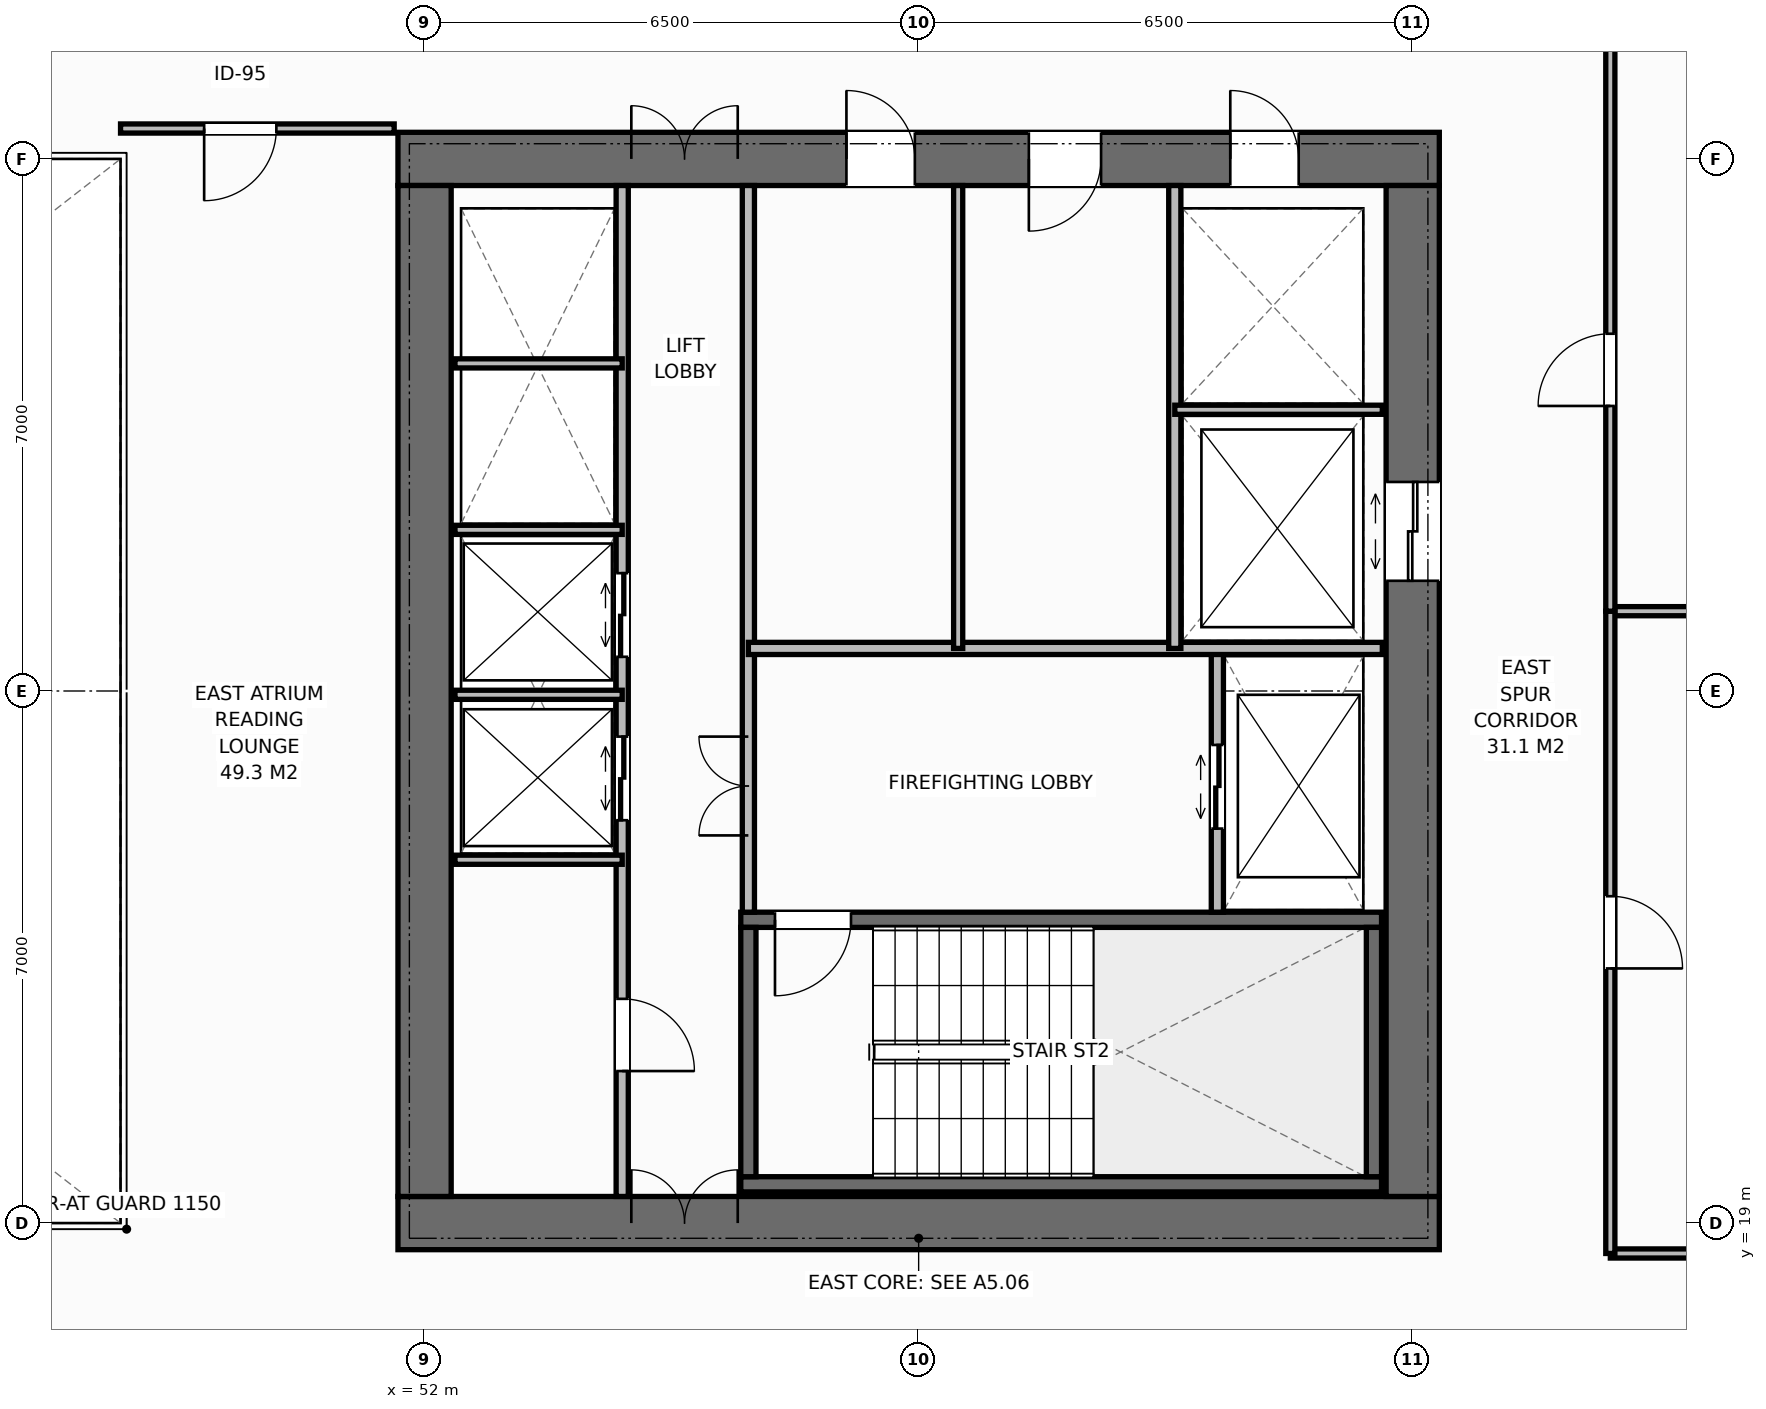
"""IFC4 building model, lengths in metres.
Left out: names, types, materials, properties, quantities, classifications, styles, units other than length and angle.
Written with IfcOpenShell. Run it as: python <this file> out.ifc"""

import sys

from ifc_helpers import new_model, si_unit, direction, frame, frame_2d, origin, place, context, subcontext, project, spatial, rectangle, extrude, element, fill, save


model = new_model("IFC4")
c1 = context("Model", 3, precision=1e-05, world=origin(), true_north=direction((0.0, 1.0)))
c2 = subcontext(c1, "Body", "Model", "MODEL_VIEW")
j1 = project(units=[si_unit("LENGTHUNIT", "METRE"), si_unit("PLANEANGLEUNIT", "RADIAN")], contexts=[c1])
p1 = place(None, origin())
s1 = spatial("IfcSite", under=j1, at=p1, CompositionType="ELEMENT")
p2 = place(p1, origin())
s2 = spatial("IfcBuilding", under=s1, at=p2, CompositionType="ELEMENT")
p3 = place(p2, frame((0.0, 0.0, 127.8)))
s3 = spatial("IfcBuildingStorey", under=s2, at=p3, CompositionType="ELEMENT", Elevation=127.8)
p4 = place(p3, frame((51.65, 19.0, 0.0), z_axis=(0.0, 0.0, 1.0), x_axis=(1.0, 0.0, 0.0)))
e1 = element("IfcWall", 1, at=p4, inside=s3, PredefinedType="SHEAR", context=c2, shape_type="SweptSolid", body=[
    extrude(rectangle(XDim=13.7, YDim=0.7, at=frame_2d((6.85, 0.0))), origin(), (0.0, 0.0, 1.0), 3.8),
])
p5 = place(p4, frame((3.07, 0.0, 0.0)))
e2 = element("IfcOpeningElement", 2, at=p5, cuts=e1, PredefinedType="OPENING", context=c2, shape_type="SweptSolid", body=[
    extrude(rectangle(XDim=1.4, YDim=2.2, at=frame_2d((0.7, 1.1))), frame((0.0, 0.36, 0.0), z_axis=(0.0, -1.0, 0.0), x_axis=(1.0, 0.0, 0.0)), (0.0, 0.0, 1.0), 0.72),
])
p6 = place(p3, frame((51.65, 33.0, 0.0), z_axis=(0.0, 0.0, 1.0), x_axis=(1.0, 0.0, 0.0)))
e3 = element("IfcWall", 3, at=p6, inside=s3, PredefinedType="SHEAR", context=c2, shape_type="SweptSolid", body=[
    extrude(rectangle(XDim=13.7, YDim=0.7, at=frame_2d((6.85, 0.0))), origin(), (0.0, 0.0, 1.0), 3.8),
])
p7 = place(p6, frame((3.07, 0.0, 0.0)))
e4 = element("IfcOpeningElement", 4, at=p7, cuts=e3, PredefinedType="OPENING", context=c2, shape_type="SweptSolid", body=[
    extrude(rectangle(XDim=1.4, YDim=2.2, at=frame_2d((0.7, 1.1))), frame((0.0, 0.36, 0.0), z_axis=(0.0, -1.0, 0.0), x_axis=(1.0, 0.0, 0.0)), (0.0, 0.0, 1.0), 0.72),
])
p8 = place(p6, frame((10.95, 0.0, 0.0)))
e5 = element("IfcOpeningElement", 5, at=p8, cuts=e3, PredefinedType="OPENING", context=c2, shape_type="SweptSolid", body=[
    extrude(rectangle(XDim=0.9, YDim=2.15, at=frame_2d((0.45, 1.075))), frame((0.0, 0.36, 0.0), z_axis=(0.0, -1.0, 0.0), x_axis=(1.0, 0.0, 0.0)), (0.0, 0.0, 1.0), 0.72),
])
p9 = place(p6, frame((5.9, 0.0, 0.0)))
e6 = element("IfcOpeningElement", 6, at=p9, cuts=e3, PredefinedType="OPENING", context=c2, shape_type="SweptSolid", body=[
    extrude(rectangle(XDim=0.9, YDim=2.15, at=frame_2d((0.45, 1.075))), frame((0.0, 0.36, 0.0), z_axis=(0.0, -1.0, 0.0), x_axis=(1.0, 0.0, 0.0)), (0.0, 0.0, 1.0), 0.72),
])
p10 = place(p6, frame((8.3, 0.0, 0.0)))
e7 = element("IfcOpeningElement", 7, at=p10, cuts=e3, PredefinedType="OPENING", context=c2, shape_type="SweptSolid", body=[
    extrude(rectangle(XDim=0.95, YDim=2.15, at=frame_2d((0.475, 1.075))), frame((0.0, 0.36, 0.0), z_axis=(0.0, -1.0, 0.0), x_axis=(1.0, 0.0, 0.0)), (0.0, 0.0, 1.0), 0.72),
])
p11 = place(p3, frame((52.0, 19.35, 0.0), z_axis=(0.0, 0.0, 1.0), x_axis=(0.0, 1.0, 0.0)))
e8 = element("IfcWall", 8, at=p11, inside=s3, PredefinedType="SHEAR", context=c2, shape_type="SweptSolid", body=[
    extrude(rectangle(XDim=13.3, YDim=0.7, at=frame_2d((6.65, 0.0))), origin(), (0.0, 0.0, 1.0), 3.8),
])
p12 = place(p3, frame((65.0, 19.35, 0.0), z_axis=(0.0, 0.0, 1.0), x_axis=(0.0, 1.0, 0.0)))
e9 = element("IfcWall", 9, at=p12, inside=s3, PredefinedType="SHEAR", context=c2, shape_type="SweptSolid", body=[
    extrude(rectangle(XDim=13.3, YDim=0.7, at=frame_2d((6.65, 0.0))), origin(), (0.0, 0.0, 1.0), 3.8),
])
p13 = place(p12, frame((8.1, 0.0, 0.0)))
e10 = element("IfcOpeningElement", 10, at=p13, cuts=e9, PredefinedType="OPENING", context=c2, shape_type="SweptSolid", body=[
    extrude(rectangle(XDim=1.3, YDim=2.2, at=frame_2d((0.65, 1.1))), frame((0.0, 0.36, 0.0), z_axis=(0.0, -1.0, 0.0), x_axis=(1.0, 0.0, 0.0)), (0.0, 0.0, 1.0), 0.72),
])
p14 = place(p3, frame((56.16, 19.51, 0.0), z_axis=(0.0, 0.0, 1.0), x_axis=(1.0, 0.0, 0.0)))
e11 = element("IfcWall", 11, at=p14, inside=s3, PredefinedType="SHEAR", context=c2, shape_type="SweptSolid", body=[
    extrude(rectangle(XDim=8.43, YDim=0.2, at=frame_2d((4.215, 0.0))), origin(), (0.0, 0.0, 1.0), 3.8),
])
p15 = place(p3, frame((56.16, 22.99, 0.0), z_axis=(0.0, 0.0, 1.0), x_axis=(1.0, 0.0, 0.0)))
e12 = element("IfcWall", 12, at=p15, inside=s3, PredefinedType="SHEAR", context=c2, shape_type="SweptSolid", body=[
    extrude(rectangle(XDim=8.43, YDim=0.2, at=frame_2d((4.215, 0.0))), origin(), (0.0, 0.0, 1.0), 3.8),
])
p16 = place(p15, frame((0.45, 0.0, 0.0)))
e13 = element("IfcOpeningElement", 13, at=p16, cuts=e12, PredefinedType="OPENING", context=c2, shape_type="SweptSolid", body=[
    extrude(rectangle(XDim=1.0, YDim=2.15, at=frame_2d((0.5, 1.075))), frame((0.0, 0.11, 0.0), z_axis=(0.0, -1.0, 0.0), x_axis=(1.0, 0.0, 0.0)), (0.0, 0.0, 1.0), 0.22),
])
for number, where, z_axis, x_axis in (
    (14, (56.26, 19.61, 0.0), (0.0, 0.0, 1.0), (0.0, 1.0, 0.0)),
    (15, (64.49, 19.61, 0.0), (0.0, 0.0, 1.0), (0.0, 1.0, 0.0)),
):
    element("IfcWall", number, at=place(p3, frame(where, z_axis=z_axis, x_axis=x_axis)), inside=s3, PredefinedType="SHEAR", context=c2, shape_type="SweptSolid", body=[
        extrude(rectangle(XDim=3.28, YDim=0.2, at=frame_2d((1.64, 0.0))), origin(), (0.0, 0.0, 1.0), 3.8),
    ])
p17 = place(p3, frame((54.6, 19.35, 0.0), z_axis=(0.0, 0.0, 1.0), x_axis=(0.0, 1.0, 0.0)))
e16 = element("IfcWall", 16, at=p17, inside=s3, PredefinedType="STANDARD", context=c2, shape_type="SweptSolid", body=[
    extrude(rectangle(XDim=13.3, YDim=0.16, at=frame_2d((6.65, 0.0))), origin(), (0.0, 0.0, 1.0), 3.565),
])
p18 = place(p17, frame((1.65, 0.0, 0.0)))
e17 = element("IfcOpeningElement", 17, at=p18, cuts=e16, PredefinedType="OPENING", context=c2, shape_type="SweptSolid", body=[
    extrude(rectangle(XDim=0.95, YDim=2.15, at=frame_2d((0.475, 1.075))), frame((0.0, 0.09, 0.0), z_axis=(0.0, -1.0, 0.0), x_axis=(1.0, 0.0, 0.0)), (0.0, 0.0, 1.0), 0.18),
])
p19 = place(p17, frame((4.95, 0.0, 0.0)))
e18 = element("IfcOpeningElement", 18, at=p19, cuts=e16, PredefinedType="OPENING", context=c2, shape_type="SweptSolid", body=[
    extrude(rectangle(XDim=1.1, YDim=2.2, at=frame_2d((0.55, 1.1))), frame((0.0, 0.09, 0.0), z_axis=(0.0, -1.0, 0.0), x_axis=(1.0, 0.0, 0.0)), (0.0, 0.0, 1.0), 0.18),
])
p20 = place(p17, frame((7.1, 0.0, 0.0)))
e19 = element("IfcOpeningElement", 19, at=p20, cuts=e16, PredefinedType="OPENING", context=c2, shape_type="SweptSolid", body=[
    extrude(rectangle(XDim=1.1, YDim=2.2, at=frame_2d((0.55, 1.1))), frame((0.0, 0.09, 0.0), z_axis=(0.0, -1.0, 0.0), x_axis=(1.0, 0.0, 0.0)), (0.0, 0.0, 1.0), 0.18),
])
p21 = place(p3, frame((56.26, 23.09, 0.0), z_axis=(0.0, 0.0, 1.0), x_axis=(0.0, 1.0, 0.0)))
e20 = element("IfcWall", 20, at=p21, inside=s3, PredefinedType="STANDARD", context=c2, shape_type="SweptSolid", body=[
    extrude(rectangle(XDim=9.56, YDim=0.16, at=frame_2d((4.78, 0.0))), origin(), (0.0, 0.0, 1.0), 3.565),
])
p22 = place(p21, frame((1.01, 0.0, 0.0)))
e21 = element("IfcOpeningElement", 21, at=p22, cuts=e20, PredefinedType="OPENING", context=c2, shape_type="SweptSolid", body=[
    extrude(rectangle(XDim=1.3, YDim=2.2, at=frame_2d((0.65, 1.1))), frame((0.0, 0.09, 0.0), z_axis=(0.0, -1.0, 0.0), x_axis=(1.0, 0.0, 0.0)), (0.0, 0.0, 1.0), 0.18),
])
for number, where, z_axis, x_axis in (
    (22, (52.4, 23.78, 0.0), (0.0, 0.0, 1.0), (1.0, 0.0, 0.0)),
    (23, (52.4, 25.95, 0.0), (0.0, 0.0, 1.0), (1.0, 0.0, 0.0)),
    (24, (52.4, 28.12, 0.0), (0.0, 0.0, 1.0), (1.0, 0.0, 0.0)),
    (25, (52.4, 30.31, 0.0), (0.0, 0.0, 1.0), (1.0, 0.0, 0.0)),
):
    element("IfcWall", number, at=place(p3, frame(where, z_axis=z_axis, x_axis=x_axis)), inside=s3, PredefinedType="PARTITIONING", context=c2, shape_type="SweptSolid", body=[
        extrude(rectangle(XDim=2.2, YDim=0.12, at=frame_2d((1.1, 0.0))), origin(), (0.0, 0.0, 1.0), 3.565),
    ])
p23 = place(p3, frame((62.43, 23.09, 0.0), z_axis=(0.0, 0.0, 1.0), x_axis=(0.0, 1.0, 0.0)))
e26 = element("IfcWall", 26, at=p23, inside=s3, PredefinedType="STANDARD", context=c2, shape_type="SweptSolid", body=[
    extrude(rectangle(XDim=3.47, YDim=0.16, at=frame_2d((1.735, 0.0))), origin(), (0.0, 0.0, 1.0), 3.565),
])
p24 = place(p23, frame((1.1, 0.0, 0.0)))
e27 = element("IfcOpeningElement", 27, at=p24, cuts=e26, PredefinedType="OPENING", context=c2, shape_type="SweptSolid", body=[
    extrude(rectangle(XDim=1.1, YDim=2.2, at=frame_2d((0.55, 1.1))), frame((0.0, 0.09, 0.0), z_axis=(0.0, -1.0, 0.0), x_axis=(1.0, 0.0, 0.0)), (0.0, 0.0, 1.0), 0.18),
])
p25 = place(p3, frame((56.26, 26.56, 0.0), z_axis=(0.0, 0.0, 1.0), x_axis=(1.0, 0.0, 0.0)))
e28 = element("IfcWall", 28, at=p25, inside=s3, PredefinedType="STANDARD", context=c2, shape_type="SweptSolid", body=[
    extrude(rectangle(XDim=8.34, YDim=0.16, at=frame_2d((4.17, 0.0))), origin(), (0.0, 0.0, 1.0), 3.565),
])
p26 = place(p3, frame((61.87, 26.56, 0.0), z_axis=(0.0, 0.0, 1.0), x_axis=(0.0, 1.0, 0.0)))
e29 = element("IfcWall", 29, at=p26, inside=s3, PredefinedType="STANDARD", context=c2, shape_type="SweptSolid", body=[
    extrude(rectangle(XDim=6.09, YDim=0.16, at=frame_2d((3.045, 0.0))), origin(), (0.0, 0.0, 1.0), 3.565),
])
p27 = place(p3, frame((61.87, 29.7, 0.0), z_axis=(0.0, 0.0, 1.0), x_axis=(1.0, 0.0, 0.0)))
e30 = element("IfcWall", 30, at=p27, inside=s3, PredefinedType="PARTITIONING", context=c2, shape_type="SweptSolid", body=[
    extrude(rectangle(XDim=2.73, YDim=0.12, at=frame_2d((1.365, 0.0))), origin(), (0.0, 0.0, 1.0), 3.565),
])
p28 = place(p3, frame((59.02, 26.56, 0.0), z_axis=(0.0, 0.0, 1.0), x_axis=(0.0, 1.0, 0.0)))
e31 = element("IfcWall", 31, at=p28, inside=s3, PredefinedType="PARTITIONING", context=c2, shape_type="SweptSolid", body=[
    extrude(rectangle(XDim=6.09, YDim=0.12, at=frame_2d((3.045, 0.0))), origin(), (0.0, 0.0, 1.0), 3.565),
])
p29 = place(p3, frame((48.0, 33.4, 0.0), z_axis=(0.0, 0.0, 1.0), x_axis=(1.0, 0.0, 0.0)))
e32 = element("IfcWall", 32, at=p29, inside=s3, PredefinedType="PARTITIONING", context=c2, shape_type="SweptSolid", body=[
    extrude(rectangle(XDim=3.6, YDim=0.12, at=frame_2d((1.8, 0.0))), origin(), (0.0, 0.0, 1.0), 3.565),
])
p30 = place(p29, frame((1.1, 0.0, 0.0)))
e33 = element("IfcOpeningElement", 33, at=p30, cuts=e32, PredefinedType="OPENING", context=c2, shape_type="SweptSolid", body=[
    extrude(rectangle(XDim=0.95, YDim=2.15, at=frame_2d((0.475, 1.075))), frame((0.0, 0.07, 0.0), z_axis=(0.0, -1.0, 0.0), x_axis=(1.0, 0.0, 0.0)), (0.0, 0.0, 1.0), 0.14),
])
for number, where, z_axis, x_axis in (
    (34, (67.6, 18.6, 0.0), (0.0, 0.0, 1.0), (1.0, 0.0, 0.0)),
    (35, (67.6, 27.05, 0.0), (0.0, 0.0, 1.0), (1.0, 0.0, 0.0)),
):
    element("IfcWall", number, at=place(p3, frame(where, z_axis=z_axis, x_axis=x_axis)), inside=s3, PredefinedType="PARTITIONING", context=c2, shape_type="SweptSolid", body=[
        extrude(rectangle(XDim=8.58, YDim=0.12, at=frame_2d((4.29, 0.0))), origin(), (0.0, 0.0, 1.0), 3.565),
    ])
p31 = place(p3, frame((67.6, 18.6, 0.0), z_axis=(0.0, 0.0, 1.0), x_axis=(0.0, 1.0, 0.0)))
e36 = element("IfcWall", 36, at=p31, inside=s3, PredefinedType="PARTITIONING", context=c2, shape_type="SweptSolid", body=[
    extrude(rectangle(XDim=8.45, YDim=0.12, at=frame_2d((4.225, 0.0))), origin(), (0.0, 0.0, 1.0), 3.565),
])
p32 = place(p31, frame((3.75, 0.0, 0.0)))
e37 = element("IfcOpeningElement", 37, at=p32, cuts=e36, PredefinedType="OPENING", context=c2, shape_type="SweptSolid", body=[
    extrude(rectangle(XDim=0.95, YDim=2.15, at=frame_2d((0.475, 1.075))), frame((0.0, 0.07, 0.0), z_axis=(0.0, -1.0, 0.0), x_axis=(1.0, 0.0, 0.0)), (0.0, 0.0, 1.0), 0.14),
])
p33 = place(p3, frame((67.6, 27.05, 0.0), z_axis=(0.0, 0.0, 1.0), x_axis=(0.0, 1.0, 0.0)))
e38 = element("IfcWall", 38, at=p33, inside=s3, PredefinedType="PARTITIONING", context=c2, shape_type="SweptSolid", body=[
    extrude(rectangle(XDim=8.45, YDim=0.12, at=frame_2d((4.225, 0.0))), origin(), (0.0, 0.0, 1.0), 3.565),
])
p34 = place(p33, frame((2.7, 0.0, 0.0)))
e39 = element("IfcOpeningElement", 39, at=p34, cuts=e38, PredefinedType="OPENING", context=c2, shape_type="SweptSolid", body=[
    extrude(rectangle(XDim=0.95, YDim=2.15, at=frame_2d((0.475, 1.075))), frame((0.0, 0.07, 0.0), z_axis=(0.0, -1.0, 0.0), x_axis=(1.0, 0.0, 0.0)), (0.0, 0.0, 1.0), 0.14),
])
p35 = place(p5, origin())
e40 = element("IfcDoor", 40, at=p35, inside=s3, OperationType="DOUBLE_DOOR_SINGLE_SWING", PredefinedType="DOOR", context=c2, shape_type="SweptSolid", body=[
    extrude(rectangle(XDim=1.4, YDim=2.2, at=frame_2d((0.7, 1.1))), frame((0.0, 0.125, 0.0), z_axis=(0.0, -1.0, 0.0), x_axis=(1.0, 0.0, 0.0)), (0.0, 0.0, 1.0), 0.05),
])
fill(e2, e40)
p36 = place(p7, origin())
e41 = element("IfcDoor", 41, at=p36, inside=s3, OperationType="DOUBLE_DOOR_SINGLE_SWING", PredefinedType="DOOR", context=c2, shape_type="SweptSolid", body=[
    extrude(rectangle(XDim=1.4, YDim=2.2, at=frame_2d((0.7, 1.1))), frame((0.0, -0.075, 0.0), z_axis=(0.0, -1.0, 0.0), x_axis=(1.0, 0.0, 0.0)), (0.0, 0.0, 1.0), 0.05),
])
fill(e4, e41)
p37 = place(p18, origin())
e42 = element("IfcDoor", 42, at=p37, inside=s3, OperationType="SINGLE_SWING_RIGHT", PredefinedType="DOOR", context=c2, shape_type="SweptSolid", body=[
    extrude(rectangle(XDim=0.95, YDim=2.15, at=frame_2d((0.475, 1.075))), frame((0.0, 0.025, 0.0), z_axis=(0.0, -1.0, 0.0), x_axis=(1.0, 0.0, 0.0)), (0.0, 0.0, 1.0), 0.05),
])
fill(e17, e42)
p38 = place(p19, origin())
e43 = element("IfcDoor", 43, at=p38, inside=s3, OperationType="DOUBLE_DOOR_SLIDING", PredefinedType="DOOR", context=c2, shape_type="SweptSolid", body=[
    extrude(rectangle(XDim=1.1, YDim=2.2, at=frame_2d((0.55, 1.1))), frame((0.0, 0.025, 0.0), z_axis=(0.0, -1.0, 0.0), x_axis=(1.0, 0.0, 0.0)), (0.0, 0.0, 1.0), 0.05),
])
fill(e18, e43)
p39 = place(p20, origin())
e44 = element("IfcDoor", 44, at=p39, inside=s3, OperationType="DOUBLE_DOOR_SLIDING", PredefinedType="DOOR", context=c2, shape_type="SweptSolid", body=[
    extrude(rectangle(XDim=1.1, YDim=2.2, at=frame_2d((0.55, 1.1))), frame((0.0, 0.025, 0.0), z_axis=(0.0, -1.0, 0.0), x_axis=(1.0, 0.0, 0.0)), (0.0, 0.0, 1.0), 0.05),
])
fill(e19, e44)
p40 = place(p16, origin())
e45 = element("IfcDoor", 45, at=p40, inside=s3, OperationType="SINGLE_SWING_RIGHT", PredefinedType="DOOR", context=c2, shape_type="SweptSolid", body=[
    extrude(rectangle(XDim=1.0, YDim=2.15, at=frame_2d((0.5, 1.075))), frame((0.0, 0.025, 0.0), z_axis=(0.0, -1.0, 0.0), x_axis=(1.0, 0.0, 0.0)), (0.0, 0.0, 1.0), 0.05),
])
fill(e13, e45)
p41 = place(p24, origin())
e46 = element("IfcDoor", 46, at=p41, inside=s3, OperationType="DOUBLE_DOOR_SLIDING", PredefinedType="DOOR", context=c2, shape_type="SweptSolid", body=[
    extrude(rectangle(XDim=1.1, YDim=2.2, at=frame_2d((0.55, 1.1))), frame((0.0, 0.025, 0.0), z_axis=(0.0, -1.0, 0.0), x_axis=(1.0, 0.0, 0.0)), (0.0, 0.0, 1.0), 0.05),
])
fill(e27, e46)
p42 = place(p22, origin())
e47 = element("IfcDoor", 47, at=p42, inside=s3, OperationType="DOUBLE_DOOR_SINGLE_SWING", PredefinedType="DOOR", context=c2, shape_type="SweptSolid", body=[
    extrude(rectangle(XDim=1.3, YDim=2.2, at=frame_2d((0.65, 1.1))), frame((0.0, 0.025, 0.0), z_axis=(0.0, -1.0, 0.0), x_axis=(1.0, 0.0, 0.0)), (0.0, 0.0, 1.0), 0.05),
])
fill(e21, e47)
p43 = place(p13, origin())
e48 = element("IfcDoor", 48, at=p43, inside=s3, OperationType="DOUBLE_DOOR_SLIDING", PredefinedType="DOOR", context=c2, shape_type="SweptSolid", body=[
    extrude(rectangle(XDim=1.3, YDim=2.2, at=frame_2d((0.65, 1.1))), frame((0.0, 0.025, 0.0), z_axis=(0.0, -1.0, 0.0), x_axis=(1.0, 0.0, 0.0)), (0.0, 0.0, 1.0), 0.05),
])
fill(e10, e48)
p44 = place(p8, origin())
e49 = element("IfcDoor", 49, at=p44, inside=s3, OperationType="SINGLE_SWING_LEFT", PredefinedType="DOOR", context=c2, shape_type="SweptSolid", body=[
    extrude(rectangle(XDim=0.9, YDim=2.15, at=frame_2d((0.45, 1.075))), frame((0.0, -0.075, 0.0), z_axis=(0.0, -1.0, 0.0), x_axis=(1.0, 0.0, 0.0)), (0.0, 0.0, 1.0), 0.05),
])
fill(e5, e49)
p45 = place(p9, origin())
e50 = element("IfcDoor", 50, at=p45, inside=s3, OperationType="SINGLE_SWING_LEFT", PredefinedType="DOOR", context=c2, shape_type="SweptSolid", body=[
    extrude(rectangle(XDim=0.9, YDim=2.15, at=frame_2d((0.45, 1.075))), frame((0.0, -0.075, 0.0), z_axis=(0.0, -1.0, 0.0), x_axis=(1.0, 0.0, 0.0)), (0.0, 0.0, 1.0), 0.05),
])
fill(e6, e50)
p46 = place(p10, origin())
e51 = element("IfcDoor", 51, at=p46, inside=s3, OperationType="SINGLE_SWING_RIGHT", PredefinedType="DOOR", context=c2, shape_type="SweptSolid", body=[
    extrude(rectangle(XDim=0.95, YDim=2.15, at=frame_2d((0.475, 1.075))), frame((0.0, -0.075, 0.0), z_axis=(0.0, -1.0, 0.0), x_axis=(1.0, 0.0, 0.0)), (0.0, 0.0, 1.0), 0.05),
])
fill(e7, e51)
p47 = place(p30, origin())
e52 = element("IfcDoor", 52, at=p47, inside=s3, OperationType="SINGLE_SWING_RIGHT", PredefinedType="DOOR", context=c2, shape_type="SweptSolid", body=[
    extrude(rectangle(XDim=0.95, YDim=2.15, at=frame_2d((0.475, 1.075))), frame((0.0, 0.025, 0.0), z_axis=(0.0, -1.0, 0.0), x_axis=(1.0, 0.0, 0.0)), (0.0, 0.0, 1.0), 0.05),
])
fill(e33, e52)
p48 = place(p32, origin())
e53 = element("IfcDoor", 53, at=p48, inside=s3, OperationType="SINGLE_SWING_RIGHT", PredefinedType="DOOR", context=c2, shape_type="SweptSolid", body=[
    extrude(rectangle(XDim=0.95, YDim=2.15, at=frame_2d((0.475, 1.075))), frame((0.0, 0.025, 0.0), z_axis=(0.0, -1.0, 0.0), x_axis=(1.0, 0.0, 0.0)), (0.0, 0.0, 1.0), 0.05),
])
fill(e37, e53)
p49 = place(p34, origin())
e54 = element("IfcDoor", 54, at=p49, inside=s3, OperationType="SINGLE_SWING_LEFT", PredefinedType="DOOR", context=c2, shape_type="SweptSolid", body=[
    extrude(rectangle(XDim=0.95, YDim=2.15, at=frame_2d((0.475, 1.075))), frame((0.0, 0.025, 0.0), z_axis=(0.0, -1.0, 0.0), x_axis=(1.0, 0.0, 0.0)), (0.0, 0.0, 1.0), 0.05),
])
fill(e39, e54)
save(model, sys.argv[1])
